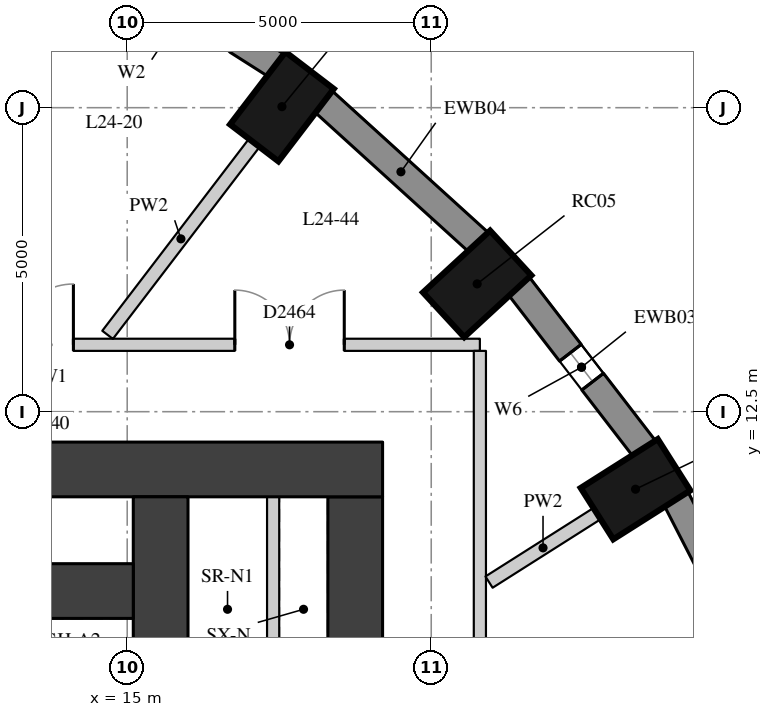
"""IFC4 building model, lengths in metres.
Left out: names, types, materials, properties, quantities, classifications, styles, units other than length and angle.
Written with IfcOpenShell. Run it as: python <this file> out.ifc"""

import sys

from ifc_helpers import new_model, si_unit, direction, frame, frame_2d, origin, origin_2d, place, context, subcontext, project, spatial, rectangle, extrude, element, fill, save


model = new_model("IFC4")
c1 = context("Model", 3, precision=1e-05, world=origin(), true_north=direction((0.0, 1.0)))
c2 = subcontext(c1, "Body", "Model", "MODEL_VIEW")
j1 = project(units=[si_unit("LENGTHUNIT", "METRE"), si_unit("PLANEANGLEUNIT", "RADIAN")], contexts=[c1])
p1 = place(None, origin())
s1 = spatial("IfcSite", under=j1, at=p1, CompositionType="ELEMENT")
p2 = place(p1, origin())
s2 = spatial("IfcBuilding", under=s1, at=p2, CompositionType="ELEMENT")
p3 = place(p2, frame((0.0, 0.0, 88.9)))
s3 = spatial("IfcBuildingStorey", under=s2, at=p3, CompositionType="ELEMENT", Elevation=88.9)
for number, where, z_axis, x_axis in (
    (1, (23.36, 11.225, 0.0), (0.0, 0.0, 1.0), (0.845, 0.536, 0.0)),
    (2, (20.755, 14.602, 0.0), (0.0, 0.0, 1.0), (0.735, 0.678, 0.0)),
    (3, (17.545, 17.517, 0.0), (0.0, 0.0, 1.0), (0.607, 0.795, 0.0)),
):
    element("IfcColumn", number, at=place(p3, frame(where, z_axis=z_axis, x_axis=x_axis)), inside=s3, PredefinedType="COLUMN", context=c2, shape_type="SweptSolid", body=[
        extrude(rectangle(XDim=1.5, YDim=1.0, at=origin_2d()), origin(), (0.0, 0.0, 1.0), 3.3),
    ])
p4 = place(p3, frame((25.545, 8.112, 0.0), z_axis=(0.0, 0.0, 1.0), x_axis=(-0.456828186229, 0.889554949549, 0.0)))
e4 = element("IfcWall", 4, at=p4, inside=s3, PredefinedType="SOLIDWALL", context=c2, shape_type="SweptSolid", body=[
    extrude(rectangle(XDim=3.333, YDim=0.45, at=frame_2d((1.667, 0.0))), origin(), (0.0, 0.0, 1.0), 3.02),
])
p5 = place(p3, frame((23.508, 11.887, 0.0), z_axis=(0.0, 0.0, 1.0), x_axis=(-0.610693945156, 0.791866721961, 0.0)))
e5 = element("IfcWall", 5, at=p5, inside=s3, PredefinedType="SOLIDWALL", context=c2, shape_type="SweptSolid", body=[
    extrude(rectangle(XDim=3.395, YDim=0.45, at=frame_2d((1.697, 0.0))), origin(), (0.0, 0.0, 1.0), 3.02),
])
p6 = place(p5, frame((1.397, 0.0, 0.4)))
e6 = element("IfcOpeningElement", 6, at=p6, cuts=e5, PredefinedType="OPENING", context=c2, shape_type="SweptSolid", body=[
    extrude(rectangle(XDim=0.6, YDim=1.75, at=frame_2d((0.3, 0.875))), frame((0.0, 0.235, 0.0), z_axis=(0.0, -1.0, 0.0), x_axis=(1.0, 0.0, 0.0)), (0.0, 0.0, 1.0), 0.47),
])
p7 = place(p3, frame((20.784, 15.281, 0.0), z_axis=(0.0, 0.0, 1.0), x_axis=(-0.74032902847, 0.672244694739, 0.0)))
e7 = element("IfcWall", 7, at=p7, inside=s3, PredefinedType="SOLIDWALL", context=c2, shape_type="SweptSolid", body=[
    extrude(rectangle(XDim=3.464, YDim=0.45, at=frame_2d((1.732, 0.0))), origin(), (0.0, 0.0, 1.0), 3.02),
])
p8 = place(p3, frame((17.456, 18.192, 0.0), z_axis=(0.0, 0.0, 1.0), x_axis=(-0.843880549131, 0.536531097699, 0.0)))
e8 = element("IfcWall", 8, at=p8, inside=s3, PredefinedType="SOLIDWALL", context=c2, shape_type="SweptSolid", body=[
    extrude(rectangle(XDim=3.532, YDim=0.45, at=frame_2d((1.766, 0.0))), origin(), (0.0, 0.0, 1.0), 3.02),
])
p9 = place(p8, frame((0.766, 0.0, 0.4)))
e9 = element("IfcOpeningElement", 9, at=p9, cuts=e8, PredefinedType="OPENING", context=c2, shape_type="SweptSolid", body=[
    extrude(rectangle(XDim=2.0, YDim=1.75, at=frame_2d((1.0, 0.875))), frame((0.0, 0.235, 0.0), z_axis=(0.0, -1.0, 0.0), x_axis=(1.0, 0.0, 0.0)), (0.0, 0.0, 1.0), 0.47),
])
p10 = place(p3, frame((18.75, -11.1, 0.0), z_axis=(0.0, 0.0, 1.0), x_axis=(0.0, 1.0, 0.0)))
e10 = element("IfcWall", 10, at=p10, inside=s3, PredefinedType="SHEAR", context=c2, shape_type="SweptSolid", body=[
    extrude(rectangle(XDim=22.2, YDim=0.9, at=frame_2d((11.1, 0.0))), origin(), (0.0, 0.0, 1.0), 3.02),
])
p11 = place(p10, frame((16.175, 0.0, 0.0)))
e11 = element("IfcOpeningElement", 11, at=p11, cuts=e10, PredefinedType="OPENING", context=c2, shape_type="SweptSolid", body=[
    extrude(rectangle(XDim=1.5, YDim=2.1, at=frame_2d((0.75, 1.05))), frame((0.0, 0.46, 0.0), z_axis=(0.0, -1.0, 0.0), x_axis=(1.0, 0.0, 0.0)), (0.0, 0.0, 1.0), 0.92),
])
p12 = place(p10, frame((5.025, 0.0, 0.0)))
e12 = element("IfcOpeningElement", 12, at=p12, cuts=e10, PredefinedType="OPENING", context=c2, shape_type="SweptSolid", body=[
    extrude(rectangle(XDim=1.5, YDim=2.1, at=frame_2d((0.75, 1.05))), frame((0.0, 0.46, 0.0), z_axis=(0.0, -1.0, 0.0), x_axis=(1.0, 0.0, 0.0)), (0.0, 0.0, 1.0), 0.92),
])
p13 = place(p3, frame((4.0, 11.55, 0.0), z_axis=(0.0, 0.0, 1.0), x_axis=(1.0, 0.0, 0.0)))
e13 = element("IfcWall", 13, at=p13, inside=s3, PredefinedType="SHEAR", context=c2, shape_type="SweptSolid", body=[
    extrude(rectangle(XDim=15.2, YDim=0.9, at=frame_2d((7.6, 0.0))), origin(), (0.0, 0.0, 1.0), 3.02),
])
p14 = place(p3, frame((15.55, -11.1, 0.0), z_axis=(0.0, 0.0, 1.0), x_axis=(0.0, 1.0, 0.0)))
e14 = element("IfcWall", 14, at=p14, inside=s3, PredefinedType="SHEAR", context=c2, shape_type="SweptSolid", body=[
    extrude(rectangle(XDim=22.2, YDim=0.9, at=frame_2d((11.1, 0.0))), origin(), (0.0, 0.0, 1.0), 3.02),
])
p15 = place(p14, frame((15.6, 0.0, 0.0)))
e15 = element("IfcOpeningElement", 15, at=p15, cuts=e14, PredefinedType="OPENING", context=c2, shape_type="SweptSolid", body=[
    extrude(rectangle(XDim=1.0, YDim=2.1, at=frame_2d((0.5, 1.05))), frame((0.0, 0.46, 0.0), z_axis=(0.0, -1.0, 0.0), x_axis=(1.0, 0.0, 0.0)), (0.0, 0.0, 1.0), 0.92),
])
p16 = place(p14, frame((5.6, 0.0, 0.0)))
e16 = element("IfcOpeningElement", 16, at=p16, cuts=e14, PredefinedType="OPENING", context=c2, shape_type="SweptSolid", body=[
    extrude(rectangle(XDim=1.0, YDim=2.1, at=frame_2d((0.5, 1.05))), frame((0.0, 0.46, 0.0), z_axis=(0.0, -1.0, 0.0), x_axis=(1.0, 0.0, 0.0)), (0.0, 0.0, 1.0), 0.92),
])
p17 = place(p3, frame((4.9, 9.55, 0.0), z_axis=(0.0, 0.0, 1.0), x_axis=(1.0, 0.0, 0.0)))
e17 = element("IfcWall", 17, at=p17, inside=s3, PredefinedType="SHEAR", context=c2, shape_type="SweptSolid", body=[
    extrude(rectangle(XDim=10.2, YDim=0.9, at=frame_2d((5.1, 0.0))), origin(), (0.0, 0.0, 1.0), 3.02),
])
p18 = place(p3, frame((17.4, 7.4, 0.0), z_axis=(0.0, 0.0, 1.0), x_axis=(0.0, 1.0, 0.0)))
e18 = element("IfcWall", 18, at=p18, inside=s3, PredefinedType="PARTITIONING", context=c2, shape_type="SweptSolid", body=[
    extrude(rectangle(XDim=3.7, YDim=0.2, at=frame_2d((1.85, 0.0))), origin(), (0.0, 0.0, 1.0), 3.02),
])
p19 = place(p3, frame((6.589, 13.6, 0.0), z_axis=(0.0, 0.0, 1.0), x_axis=(1.0, 0.0, 0.0)))
e19 = element("IfcWall", 19, at=p19, inside=s3, PredefinedType="PARTITIONING", context=c2, shape_type="SweptSolid", body=[
    extrude(rectangle(XDim=14.211, YDim=0.2, at=frame_2d((7.106, 0.0))), origin(), (0.0, 0.0, 1.0), 3.02),
])
p20 = place(p19, frame((6.527, 0.0, 0.0)))
e20 = element("IfcOpeningElement", 20, at=p20, cuts=e19, PredefinedType="OPENING", context=c2, shape_type="SweptSolid", body=[
    extrude(rectangle(XDim=1.0, YDim=2.1, at=frame_2d((0.5, 1.05))), frame((0.0, 0.11, 0.0), z_axis=(0.0, -1.0, 0.0), x_axis=(1.0, 0.0, 0.0)), (0.0, 0.0, 1.0), 0.22),
])
p21 = place(p19, frame((0.423, 0.0, 0.0)))
e21 = element("IfcOpeningElement", 21, at=p21, cuts=e19, PredefinedType="OPENING", context=c2, shape_type="SweptSolid", body=[
    extrude(rectangle(XDim=1.1, YDim=2.1, at=frame_2d((0.55, 1.05))), frame((0.0, 0.11, 0.0), z_axis=(0.0, -1.0, 0.0), x_axis=(1.0, 0.0, 0.0)), (0.0, 0.0, 1.0), 0.22),
])
p22 = place(p19, frame((10.181, 0.0, 0.0)))
e22 = element("IfcOpeningElement", 22, at=p22, cuts=e19, PredefinedType="OPENING", context=c2, shape_type="SweptSolid", body=[
    extrude(rectangle(XDim=1.8, YDim=2.1, at=frame_2d((0.9, 1.05))), frame((0.0, 0.11, 0.0), z_axis=(0.0, -1.0, 0.0), x_axis=(1.0, 0.0, 0.0)), (0.0, 0.0, 1.0), 0.22),
])
p23 = place(p3, frame((20.8, 13.5, 0.0), z_axis=(0.0, 0.0, 1.0), x_axis=(0.0, -1.0, 0.0)))
e23 = element("IfcWall", 23, at=p23, inside=s3, PredefinedType="PARTITIONING", context=c2, shape_type="SweptSolid", body=[
    extrude(rectangle(XDim=27.1, YDim=0.2, at=frame_2d((13.55, 0.0))), origin(), (0.0, 0.0, 1.0), 3.02),
])
p24 = place(p23, frame((22.844, 0.0, 0.0)))
e24 = element("IfcOpeningElement", 24, at=p24, cuts=e23, PredefinedType="OPENING", context=c2, shape_type="SweptSolid", body=[
    extrude(rectangle(XDim=1.8, YDim=2.1, at=frame_2d((0.9, 1.05))), frame((0.0, 0.11, 0.0), z_axis=(0.0, -1.0, 0.0), x_axis=(1.0, 0.0, 0.0)), (0.0, 0.0, 1.0), 0.22),
])
p25 = place(p23, frame((16.35, 0.0, 0.0)))
e25 = element("IfcOpeningElement", 25, at=p25, cuts=e23, PredefinedType="OPENING", context=c2, shape_type="SweptSolid", body=[
    extrude(rectangle(XDim=1.8, YDim=2.1, at=frame_2d((0.9, 1.05))), frame((0.0, 0.11, 0.0), z_axis=(0.0, -1.0, 0.0), x_axis=(1.0, 0.0, 0.0)), (0.0, 0.0, 1.0), 0.22),
])
p26 = place(p23, frame((7.996, 0.0, 0.0)))
e26 = element("IfcOpeningElement", 26, at=p26, cuts=e23, PredefinedType="OPENING", context=c2, shape_type="SweptSolid", body=[
    extrude(rectangle(XDim=1.8, YDim=2.1, at=frame_2d((0.9, 1.05))), frame((0.0, 0.11, 0.0), z_axis=(0.0, -1.0, 0.0), x_axis=(1.0, 0.0, 0.0)), (0.0, 0.0, 1.0), 0.22),
])
p27 = place(p3, frame((22.727, 10.823, 0.0), z_axis=(0.0, 0.0, 1.0), x_axis=(-0.844549560094, -0.53547739499, 0.0)))
e27 = element("IfcWall", 27, at=p27, inside=s3, PredefinedType="PARTITIONING", context=c2, shape_type="SweptSolid", body=[
    extrude(rectangle(XDim=2.103, YDim=0.22, at=frame_2d((1.051, 0.0))), origin(), (0.0, 0.0, 1.0), 3.02),
])
p28 = place(p3, frame((17.089, 16.921, 0.0), z_axis=(0.0, 0.0, 1.0), x_axis=(-0.607055443677, -0.794659479464, 0.0)))
e28 = element("IfcWall", 28, at=p28, inside=s3, PredefinedType="PARTITIONING", context=c2, shape_type="SweptSolid", body=[
    extrude(rectangle(XDim=3.973, YDim=0.22, at=frame_2d((1.987, 0.0))), origin(), (0.0, 0.0, 1.0), 3.02),
])
p29 = place(p6, origin())
e29 = element("IfcWindow", 29, at=p29, inside=s3, PartitioningType="SINGLE_PANEL", PredefinedType="WINDOW", context=c2, shape_type="SweptSolid", body=[
    extrude(rectangle(XDim=0.6, YDim=1.75, at=frame_2d((0.3, 0.875))), frame((0.0, 0.035, 0.0), z_axis=(0.0, -1.0, 0.0), x_axis=(1.0, 0.0, 0.0)), (0.0, 0.0, 1.0), 0.06),
])
fill(e6, e29)
p30 = place(p20, origin())
e30 = element("IfcDoor", 30, at=p30, inside=s3, OperationType="SINGLE_SWING_RIGHT", PredefinedType="DOOR", context=c2, shape_type="SweptSolid", body=[
    extrude(rectangle(XDim=1.0, YDim=2.1, at=frame_2d((0.5, 1.05))), frame((0.0, 0.025, 0.0), z_axis=(0.0, -1.0, 0.0), x_axis=(1.0, 0.0, 0.0)), (0.0, 0.0, 1.0), 0.05),
])
fill(e20, e30)
p31 = place(p22, origin())
e31 = element("IfcDoor", 31, at=p31, inside=s3, OperationType="DOUBLE_DOOR_SINGLE_SWING", PredefinedType="DOOR", context=c2, shape_type="SweptSolid", body=[
    extrude(rectangle(XDim=1.8, YDim=2.1, at=frame_2d((0.9, 1.05))), frame((0.0, 0.025, 0.0), z_axis=(0.0, -1.0, 0.0), x_axis=(1.0, 0.0, 0.0)), (0.0, 0.0, 1.0), 0.05),
])
fill(e22, e31)
save(model, sys.argv[1])
